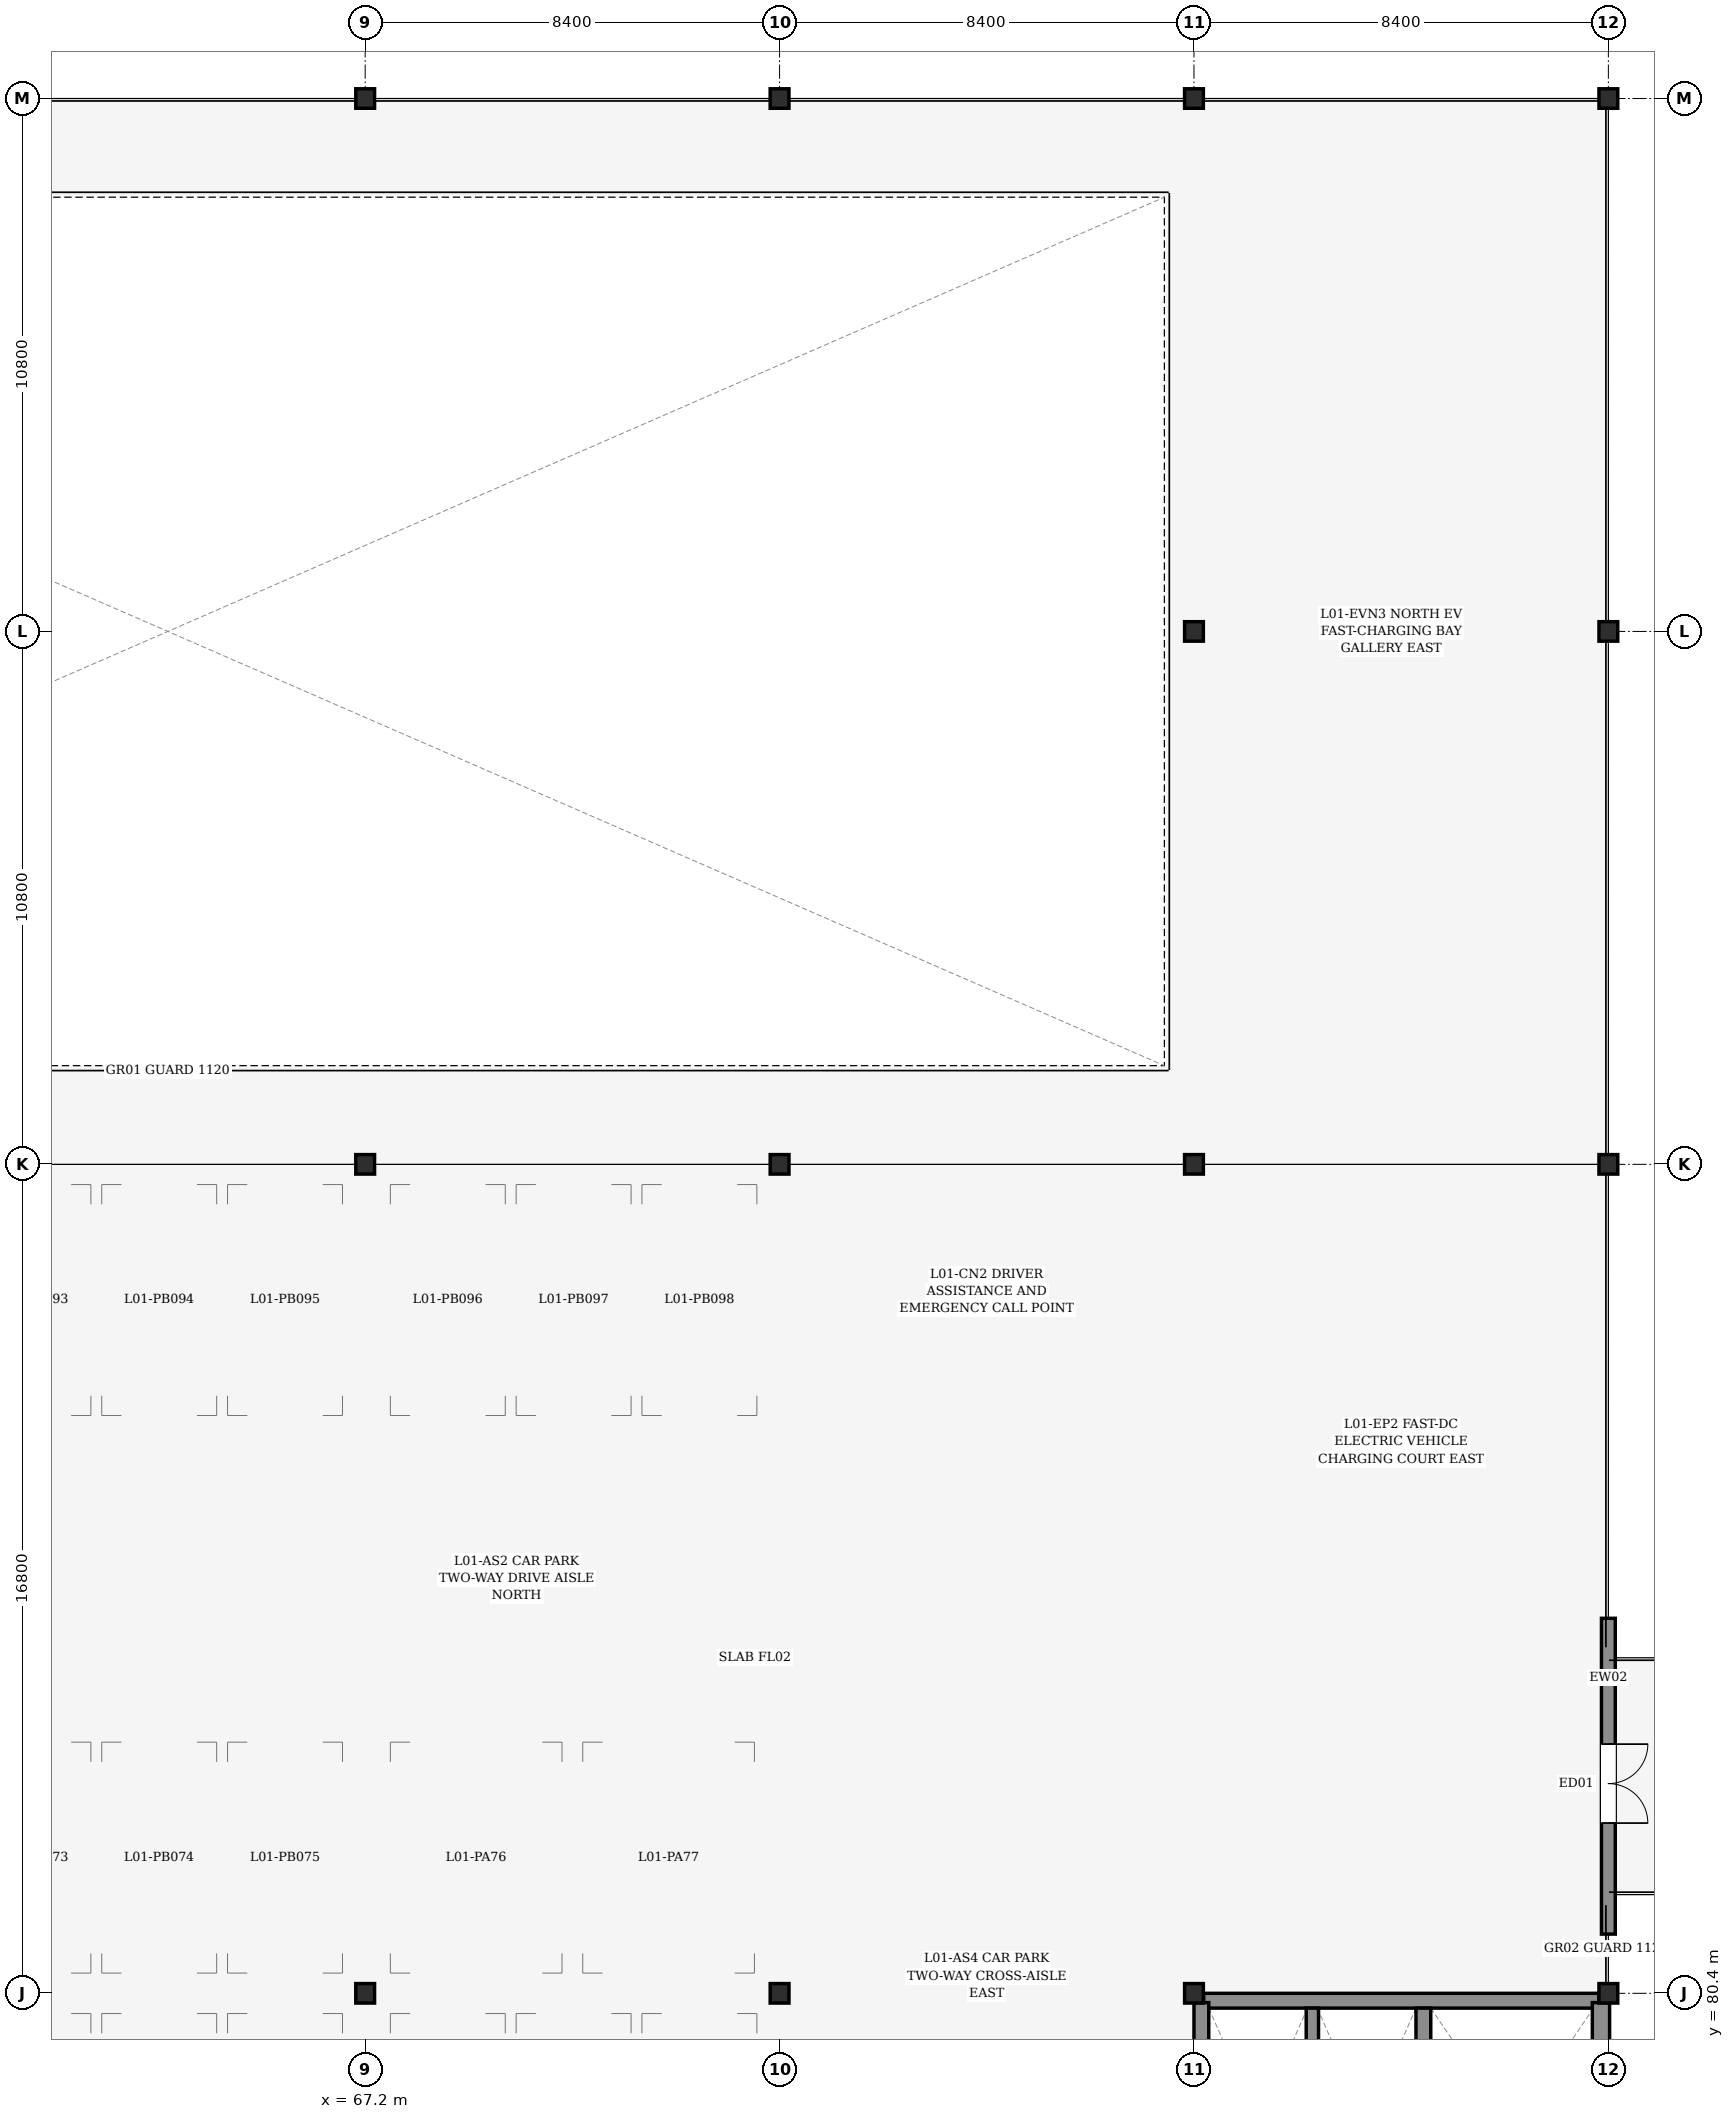
"""IFC4 building model, lengths in metres.
Left out: names, types, materials, properties, quantities, classifications, styles, units other than length and angle.
Written with IfcOpenShell. Run it as: python <this file> out.ifc"""

import sys

from ifc_helpers import new_model, si_unit, direction, frame, frame_2d, origin, origin_2d, place, context, subcontext, project, spatial, rectangle, i_section, extrude, element, fill, save


model = new_model("IFC4")
c1 = context("Model", 3, precision=1e-05, world=origin(), true_north=direction((0.0, 1.0)))
c2 = subcontext(c1, "Body", "Model", "MODEL_VIEW")
j1 = project(units=[si_unit("LENGTHUNIT", "METRE"), si_unit("PLANEANGLEUNIT", "RADIAN")], contexts=[c1])
p1 = place(None, origin())
s1 = spatial("IfcSite", under=j1, at=p1, CompositionType="ELEMENT")
p2 = place(p1, origin())
s2 = spatial("IfcBuilding", under=s1, at=p2, CompositionType="ELEMENT")
p3 = place(p2, frame((0.0, 0.0, 5.4)))
s3 = spatial("IfcBuildingStorey", under=s2, at=p3, CompositionType="ELEMENT", Elevation=5.4)
for number, where, z_axis, x_axis in (
    (1, (67.2, 80.4, 0.0), (0.0, 0.0, 1.0), (1.0, 0.0, 0.0)),
    (2, (67.2, 97.2, 0.0), (0.0, 0.0, 1.0), (1.0, 0.0, 0.0)),
    (3, (67.2, 118.8, 0.0), (0.0, 0.0, 1.0), (1.0, 0.0, 0.0)),
    (4, (75.6, 80.4, 0.0), (0.0, 0.0, 1.0), (1.0, 0.0, 0.0)),
    (5, (75.6, 97.2, 0.0), (0.0, 0.0, 1.0), (1.0, 0.0, 0.0)),
    (6, (75.6, 118.8, 0.0), (0.0, 0.0, 1.0), (1.0, 0.0, 0.0)),
    (7, (84.0, 80.4, 0.0), (0.0, 0.0, 1.0), (1.0, 0.0, 0.0)),
    (8, (84.0, 97.2, 0.0), (0.0, 0.0, 1.0), (1.0, 0.0, 0.0)),
    (9, (84.0, 108.0, 0.0), (0.0, 0.0, 1.0), (1.0, 0.0, 0.0)),
    (10, (84.0, 118.8, 0.0), (0.0, 0.0, 1.0), (1.0, 0.0, 0.0)),
    (11, (92.4, 80.4, 0.0), (0.0, 0.0, 1.0), (1.0, 0.0, 0.0)),
    (12, (92.4, 97.2, 0.0), (0.0, 0.0, 1.0), (1.0, 0.0, 0.0)),
    (13, (92.4, 108.0, 0.0), (0.0, 0.0, 1.0), (1.0, 0.0, 0.0)),
    (14, (92.4, 118.8, 0.0), (0.0, 0.0, 1.0), (1.0, 0.0, 0.0)),
):
    element("IfcColumn", number, at=place(p3, frame(where, z_axis=z_axis, x_axis=x_axis)), inside=s3, PredefinedType="COLUMN", context=c2, shape_type="SweptSolid", body=[
        extrude(i_section(OverallWidth=0.395, OverallDepth=0.381, WebThickness=0.018, FlangeThickness=0.03, FilletRadius=0.015, at=origin_2d()), origin(), (0.0, 0.0, 1.0), 3.6),
    ])
p4 = place(p3, frame((92.4, 81.6, 0.0), z_axis=(0.0, 0.0, 1.0), x_axis=(0.0, 1.0, 0.0)))
e15 = element("IfcWall", 15, at=p4, inside=s3, PredefinedType="STANDARD", context=c2, shape_type="SweptSolid", body=[
    extrude(rectangle(XDim=6.4, YDim=0.28, at=frame_2d((3.2, 0.0))), origin(), (0.0, 0.0, 1.0), 2.535),
])
p5 = place(p4, frame((2.25, 0.0, 0.0)))
e16 = element("IfcOpeningElement", 16, at=p5, cuts=e15, PredefinedType="OPENING", context=c2, shape_type="SweptSolid", body=[
    extrude(rectangle(XDim=1.6, YDim=2.2, at=frame_2d((0.8, 1.1))), frame((0.0, 0.15, 0.0), z_axis=(0.0, -1.0, 0.0), x_axis=(1.0, 0.0, 0.0)), (0.0, 0.0, 1.0), 0.3),
])
p6 = place(p3, frame((84.196, 80.25, 0.0), z_axis=(0.0, 0.0, 1.0), x_axis=(1.0, 0.0, 0.0)))
e17 = element("IfcWall", 17, at=p6, inside=s3, PredefinedType="SHEAR", context=c2, shape_type="SweptSolid", body=[
    extrude(rectangle(XDim=8.009, YDim=0.3, at=frame_2d((4.004, 0.0))), origin(), (0.0, 0.0, 1.0), 3.38),
])
p7 = place(p3, frame((92.25, 63.789, 0.0), z_axis=(0.0, 0.0, 1.0), x_axis=(0.0, 1.0, 0.0)))
e18 = element("IfcWall", 18, at=p7, inside=s3, PredefinedType="SHEAR", context=c2, shape_type="SweptSolid", body=[
    extrude(rectangle(XDim=16.423, YDim=0.35, at=frame_2d((8.211, 0.0))), origin(), (0.0, 0.0, 1.0), 3.38),
])
p8 = place(p3, frame((84.15, 63.789, 0.0), z_axis=(0.0, 0.0, 1.0), x_axis=(0.0, 1.0, 0.0)))
e19 = element("IfcWall", 19, at=p8, inside=s3, PredefinedType="SHEAR", context=c2, shape_type="SweptSolid", body=[
    extrude(rectangle(XDim=16.423, YDim=0.3, at=frame_2d((8.211, 0.0))), origin(), (0.0, 0.0, 1.0), 3.38),
])
p9 = place(p8, frame((5.662, 0.0, 0.0)))
e20 = element("IfcOpeningElement", 20, at=p9, cuts=e19, PredefinedType="OPENING", context=c2, shape_type="SweptSolid", body=[
    extrude(rectangle(XDim=1.3, YDim=2.2, at=frame_2d((0.65, 1.1))), frame((0.0, 0.16, 0.0), z_axis=(0.0, -1.0, 0.0), x_axis=(1.0, 0.0, 0.0)), (0.0, 0.0, 1.0), 0.32),
])
p10 = place(p3, frame((88.65, 63.9, 0.0), z_axis=(0.0, 0.0, 1.0), x_axis=(0.0, 1.0, 0.0)))
e21 = element("IfcWall", 21, at=p10, inside=s3, PredefinedType="SHEAR", context=c2, shape_type="SweptSolid", body=[
    extrude(rectangle(XDim=16.2, YDim=0.3, at=frame_2d((8.1, 0.0))), origin(), (0.0, 0.0, 1.0), 3.38),
])
p11 = place(p10, frame((0.5, 0.0, 0.0)))
e22 = element("IfcOpeningElement", 22, at=p11, cuts=e21, PredefinedType="OPENING", context=c2, shape_type="SweptSolid", body=[
    extrude(rectangle(XDim=1.15, YDim=2.15, at=frame_2d((0.575, 1.075))), frame((0.0, 0.16, 0.0), z_axis=(0.0, -1.0, 0.0), x_axis=(1.0, 0.0, 0.0)), (0.0, 0.0, 1.0), 0.32),
])
p12 = place(p3, frame((86.4, 75.55, 0.0), z_axis=(0.0, 0.0, 1.0), x_axis=(0.0, 1.0, 0.0)))
e23 = element("IfcWall", 23, at=p12, inside=s3, PredefinedType="PARTITIONING", context=c2, shape_type="SweptSolid", body=[
    extrude(rectangle(XDim=4.55, YDim=0.25, at=frame_2d((2.275, 0.0))), origin(), (0.0, 0.0, 1.0), 2.525),
])
p13 = place(p5, frame((1.6, 0.0, 0.0), z_axis=(0.0, 0.0, 1.0), x_axis=(-1.0, 0.0, 0.0)))
e24 = element("IfcDoor", 24, at=p13, inside=s3, OperationType="DOUBLE_DOOR_SINGLE_SWING", PredefinedType="DOOR", context=c2, shape_type="SweptSolid", body=[
    extrude(rectangle(XDim=1.6, YDim=2.2, at=frame_2d((0.8, 1.1))), frame((0.0, 0.025, 0.0), z_axis=(0.0, -1.0, 0.0), x_axis=(1.0, 0.0, 0.0)), (0.0, 0.0, 1.0), 0.05),
])
fill(e16, e24)
save(model, sys.argv[1])
